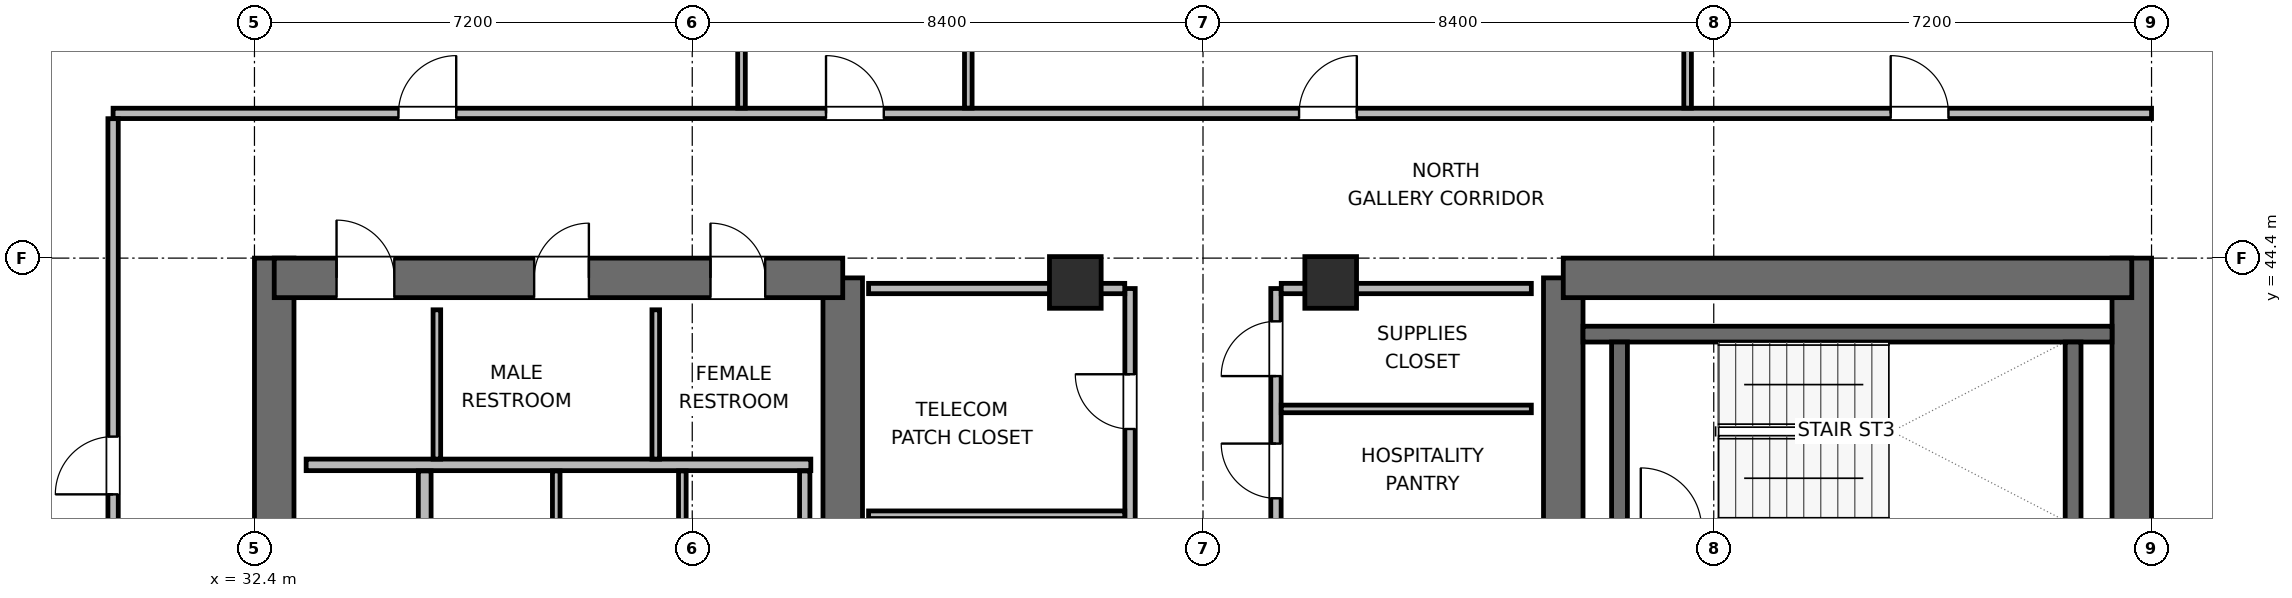
"""IFC4 building model, lengths in metres.
Left out: names, types, materials, properties, quantities, classifications, styles, units other than length and angle.
Written with IfcOpenShell. Run it as: python <this file> out.ifc"""

import sys

from ifc_helpers import new_model, si_unit, direction, frame, frame_2d, origin, origin_2d, place, context, subcontext, project, spatial, rectangle, extrude, element, fill, save


model = new_model("IFC4")
c1 = context("Model", 3, precision=1e-05, world=origin(), true_north=direction((0.0, 1.0)))
c2 = subcontext(c1, "Body", "Model", "MODEL_VIEW")
j1 = project(units=[si_unit("LENGTHUNIT", "METRE"), si_unit("PLANEANGLEUNIT", "RADIAN")], contexts=[c1])
p1 = place(None, origin())
s1 = spatial("IfcSite", under=j1, at=p1, CompositionType="ELEMENT")
p2 = place(p1, origin())
s2 = spatial("IfcBuilding", under=s1, at=p2, CompositionType="ELEMENT")
p3 = place(p2, frame((0.0, 0.0, 251.1)))
s3 = spatial("IfcBuildingStorey", under=s2, at=p3, CompositionType="ELEMENT", Elevation=251.1)
p4 = place(p3, frame((32.725, 27.6, 0.0), z_axis=(0.0, 0.0, 1.0), x_axis=(0.0, 1.0, 0.0)))
e1 = element("IfcWall", 1, at=p4, inside=s3, PredefinedType="SHEAR", context=c2, shape_type="SweptSolid", body=[
    extrude(rectangle(XDim=16.8, YDim=0.65, at=frame_2d((8.4, 0.0))), origin(), (0.0, 0.0, 1.0), 3.9),
])
p5 = place(p3, frame((42.075, 37.8, 0.0), z_axis=(0.0, 0.0, 1.0), x_axis=(0.0, 1.0, 0.0)))
e2 = element("IfcWall", 2, at=p5, inside=s3, PredefinedType="SHEAR", context=c2, shape_type="SweptSolid", body=[
    extrude(rectangle(XDim=6.275, YDim=0.65, at=frame_2d((3.137, 0.0))), origin(), (0.0, 0.0, 1.0), 3.9),
])
p6 = place(p3, frame((32.725, 44.075, 0.0), z_axis=(0.0, 0.0, 1.0), x_axis=(1.0, 0.0, 0.0)))
e3 = element("IfcWall", 3, at=p6, inside=s3, PredefinedType="SHEAR", context=c2, shape_type="SweptSolid", body=[
    extrude(rectangle(XDim=9.35, YDim=0.65, at=frame_2d((4.675, 0.0))), origin(), (0.0, 0.0, 1.0), 3.9),
])
p7 = place(p6, frame((1.025, 0.0, 0.0)))
e4 = element("IfcOpeningElement", 4, at=p7, cuts=e3, PredefinedType="OPENING", context=c2, shape_type="SweptSolid", body=[
    extrude(rectangle(XDim=0.95, YDim=2.04, at=frame_2d((0.475, 1.02))), frame((0.0, 0.335, 0.0), z_axis=(0.0, -1.0, 0.0), x_axis=(1.0, 0.0, 0.0)), (0.0, 0.0, 1.0), 0.67),
])
p8 = place(p6, frame((4.275, 0.0, 0.0)))
e5 = element("IfcOpeningElement", 5, at=p8, cuts=e3, PredefinedType="OPENING", context=c2, shape_type="SweptSolid", body=[
    extrude(rectangle(XDim=0.9, YDim=2.02, at=frame_2d((0.45, 1.01))), frame((0.0, 0.335, 0.0), z_axis=(0.0, -1.0, 0.0), x_axis=(1.0, 0.0, 0.0)), (0.0, 0.0, 1.0), 0.67),
])
p9 = place(p6, frame((7.175, 0.0, 0.0)))
e6 = element("IfcOpeningElement", 6, at=p9, cuts=e3, PredefinedType="OPENING", context=c2, shape_type="SweptSolid", body=[
    extrude(rectangle(XDim=0.9, YDim=2.02, at=frame_2d((0.45, 1.01))), frame((0.0, 0.335, 0.0), z_axis=(0.0, -1.0, 0.0), x_axis=(1.0, 0.0, 0.0)), (0.0, 0.0, 1.0), 0.67),
])
p10 = place(p3, frame((53.925, 38.0, 0.0), z_axis=(0.0, 0.0, 1.0), x_axis=(0.0, 1.0, 0.0)))
e7 = element("IfcWall", 7, at=p10, inside=s3, PredefinedType="SHEAR", context=c2, shape_type="SweptSolid", body=[
    extrude(rectangle(XDim=6.075, YDim=0.65, at=frame_2d((3.038, 0.0))), origin(), (0.0, 0.0, 1.0), 3.9),
])
p11 = place(p3, frame((63.275, 27.6, 0.0), z_axis=(0.0, 0.0, 1.0), x_axis=(0.0, 1.0, 0.0)))
e8 = element("IfcWall", 8, at=p11, inside=s3, PredefinedType="SHEAR", context=c2, shape_type="SweptSolid", body=[
    extrude(rectangle(XDim=16.8, YDim=0.65, at=frame_2d((8.4, 0.0))), origin(), (0.0, 0.0, 1.0), 3.9),
])
p12 = place(p3, frame((53.925, 44.075, 0.0), z_axis=(0.0, 0.0, 1.0), x_axis=(1.0, 0.0, 0.0)))
e9 = element("IfcWall", 9, at=p12, inside=s3, PredefinedType="SHEAR", context=c2, shape_type="SweptSolid", body=[
    extrude(rectangle(XDim=9.35, YDim=0.65, at=frame_2d((4.675, 0.0))), origin(), (0.0, 0.0, 1.0), 3.9),
])
p13 = place(p3, frame((54.25, 43.15, 0.0), z_axis=(0.0, 0.0, 1.0), x_axis=(1.0, 0.0, 0.0)))
e10 = element("IfcWall", 10, at=p13, inside=s3, PredefinedType="SHEAR", context=c2, shape_type="SweptSolid", body=[
    extrude(rectangle(XDim=8.7, YDim=0.26, at=frame_2d((4.35, 0.0))), origin(), (0.0, 0.0, 1.0), 3.9),
])
for number, where, z_axis, x_axis in (
    (11, (54.85, 40.08, 0.0), (0.0, 0.0, 1.0), (0.0, 1.0, 0.0)),
    (12, (62.31, 40.08, 0.0), (0.0, 0.0, 1.0), (0.0, 1.0, 0.0)),
):
    element("IfcWall", number, at=place(p3, frame(where, z_axis=z_axis, x_axis=x_axis)), inside=s3, PredefinedType="SHEAR", context=c2, shape_type="SweptSolid", body=[
        extrude(rectangle(XDim=2.94, YDim=0.26, at=frame_2d((1.47, 0.0))), origin(), (0.0, 0.0, 1.0), 3.9),
    ])
for number, where, z_axis, x_axis in (
    (13, (45.9, 44.0, 0.0), (0.0, 0.0, 1.0), (1.0, 0.0, 0.0)),
    (14, (50.1, 44.0, 0.0), (0.0, 0.0, 1.0), (1.0, 0.0, 0.0)),
):
    element("IfcColumn", number, at=place(p3, frame(where, z_axis=z_axis, x_axis=x_axis)), inside=s3, PredefinedType="COLUMN", context=c2, shape_type="SweptSolid", body=[
        extrude(rectangle(XDim=0.85, YDim=0.85, at=origin_2d()), origin(), (0.0, 0.0, 1.0), 3.9),
    ])
p14 = place(p3, frame((33.25, 41.0, 0.0), z_axis=(0.0, 0.0, 1.0), x_axis=(1.0, 0.0, 0.0)))
e15 = element("IfcWall", 15, at=p14, inside=s3, PredefinedType="PLUMBINGWALL", context=c2, shape_type="SweptSolid", body=[
    extrude(rectangle(XDim=8.3, YDim=0.19, at=frame_2d((4.15, 0.0))), origin(), (0.0, 0.0, 1.0), 3.68),
])
for number, where, z_axis, x_axis in (
    (16, (35.4, 41.095, 0.0), (0.0, 0.0, 1.0), (0.0, 1.0, 0.0)),
    (17, (39.0, 41.095, 0.0), (0.0, 0.0, 1.0), (0.0, 1.0, 0.0)),
):
    element("IfcWall", number, at=place(p3, frame(where, z_axis=z_axis, x_axis=x_axis)), inside=s3, PredefinedType="PARTITIONING", context=c2, shape_type="SweptSolid", body=[
        extrude(rectangle(XDim=2.455, YDim=0.125, at=frame_2d((1.228, 0.0))), origin(), (0.0, 0.0, 1.0), 3.68),
    ])
p15 = place(p3, frame((35.2, 39.58, 0.0), z_axis=(0.0, 0.0, 1.0), x_axis=(0.0, 1.0, 0.0)))
e18 = element("IfcWall", 18, at=p15, inside=s3, PredefinedType="PARTITIONING", context=c2, shape_type="SweptSolid", body=[
    extrude(rectangle(XDim=1.32, YDim=0.21, at=frame_2d((0.66, 0.0))), origin(), (0.0, 0.0, 1.0), 3.68),
])
p16 = place(p3, frame((41.45, 38.087, 0.0), z_axis=(0.0, 0.0, 1.0), x_axis=(0.0, 1.0, 0.0)))
e19 = element("IfcWall", 19, at=p16, inside=s3, PredefinedType="PARTITIONING", context=c2, shape_type="SweptSolid", body=[
    extrude(rectangle(XDim=2.813, YDim=0.17, at=frame_2d((1.406, 0.0))), origin(), (0.0, 0.0, 1.0), 3.68),
])
for number, where, z_axis, x_axis in (
    (20, (37.363, 38.087, 0.0), (0.0, 0.0, 1.0), (0.0, 1.0, 0.0)),
    (21, (39.437, 38.087, 0.0), (0.0, 0.0, 1.0), (0.0, 1.0, 0.0)),
):
    element("IfcWall", number, at=place(p3, frame(where, z_axis=z_axis, x_axis=x_axis)), inside=s3, PredefinedType="PARTITIONING", context=c2, shape_type="SweptSolid", body=[
        extrude(rectangle(XDim=2.813, YDim=0.125, at=frame_2d((1.406, 0.0))), origin(), (0.0, 0.0, 1.0), 3.68),
    ])
p17 = place(p3, frame((46.8, 37.9, 0.0), z_axis=(0.0, 0.0, 1.0), x_axis=(0.0, 1.0, 0.0)))
e22 = element("IfcWall", 22, at=p17, inside=s3, PredefinedType="PARTITIONING", context=c2, shape_type="SweptSolid", body=[
    extrude(rectangle(XDim=6.0, YDim=0.17, at=frame_2d((3.0, 0.0))), origin(), (0.0, 0.0, 1.0), 3.68),
])
p18 = place(p17, frame((0.69, 0.0, 0.0)))
e23 = element("IfcOpeningElement", 23, at=p18, cuts=e22, PredefinedType="OPENING", context=c2, shape_type="SweptSolid", body=[
    extrude(rectangle(XDim=0.9, YDim=2.02, at=frame_2d((0.45, 1.01))), frame((0.0, 0.095, 0.0), z_axis=(0.0, -1.0, 0.0), x_axis=(1.0, 0.0, 0.0)), (0.0, 0.0, 1.0), 0.19),
])
p19 = place(p17, frame((3.69, 0.0, 0.0)))
e24 = element("IfcOpeningElement", 24, at=p19, cuts=e22, PredefinedType="OPENING", context=c2, shape_type="SweptSolid", body=[
    extrude(rectangle(XDim=0.9, YDim=2.02, at=frame_2d((0.45, 1.01))), frame((0.0, 0.095, 0.0), z_axis=(0.0, -1.0, 0.0), x_axis=(1.0, 0.0, 0.0)), (0.0, 0.0, 1.0), 0.19),
])
p20 = place(p3, frame((42.5, 43.9, 0.0), z_axis=(0.0, 0.0, 1.0), x_axis=(1.0, 0.0, 0.0)))
e25 = element("IfcWall", 25, at=p20, inside=s3, PredefinedType="PARTITIONING", context=c2, shape_type="SweptSolid", body=[
    extrude(rectangle(XDim=4.213, YDim=0.17, at=frame_2d((2.106, 0.0))), origin(), (0.0, 0.0, 1.0), 2.765),
])
p21 = place(p3, frame((42.5, 40.18, 0.0), z_axis=(0.0, 0.0, 1.0), x_axis=(1.0, 0.0, 0.0)))
e26 = element("IfcWall", 26, at=p21, inside=s3, PredefinedType="PARTITIONING", context=c2, shape_type="SweptSolid", body=[
    extrude(rectangle(XDim=4.213, YDim=0.125, at=frame_2d((2.106, 0.0))), origin(), (0.0, 0.0, 1.0), 3.68),
])
p22 = place(p3, frame((49.2, 37.9, 0.0), z_axis=(0.0, 0.0, 1.0), x_axis=(0.0, 1.0, 0.0)))
e27 = element("IfcWall", 27, at=p22, inside=s3, PredefinedType="PARTITIONING", context=c2, shape_type="SweptSolid", body=[
    extrude(rectangle(XDim=6.0, YDim=0.17, at=frame_2d((3.0, 0.0))), origin(), (0.0, 0.0, 1.0), 3.68),
])
p23 = place(p22, frame((0.54, 0.0, 0.0)))
e28 = element("IfcOpeningElement", 28, at=p23, cuts=e27, PredefinedType="OPENING", context=c2, shape_type="SweptSolid", body=[
    extrude(rectangle(XDim=0.9, YDim=2.02, at=frame_2d((0.45, 1.01))), frame((0.0, 0.095, 0.0), z_axis=(0.0, -1.0, 0.0), x_axis=(1.0, 0.0, 0.0)), (0.0, 0.0, 1.0), 0.19),
])
p24 = place(p22, frame((2.55, 0.0, 0.0)))
e29 = element("IfcOpeningElement", 29, at=p24, cuts=e27, PredefinedType="OPENING", context=c2, shape_type="SweptSolid", body=[
    extrude(rectangle(XDim=0.9, YDim=2.02, at=frame_2d((0.45, 1.01))), frame((0.0, 0.095, 0.0), z_axis=(0.0, -1.0, 0.0), x_axis=(1.0, 0.0, 0.0)), (0.0, 0.0, 1.0), 0.19),
])
p25 = place(p22, frame((4.56, 0.0, 0.0)))
e30 = element("IfcOpeningElement", 30, at=p25, cuts=e27, PredefinedType="OPENING", context=c2, shape_type="SweptSolid", body=[
    extrude(rectangle(XDim=0.9, YDim=2.02, at=frame_2d((0.45, 1.01))), frame((0.0, 0.095, 0.0), z_axis=(0.0, -1.0, 0.0), x_axis=(1.0, 0.0, 0.0)), (0.0, 0.0, 1.0), 0.19),
])
p26 = place(p3, frame((49.287, 43.9, 0.0), z_axis=(0.0, 0.0, 1.0), x_axis=(1.0, 0.0, 0.0)))
e31 = element("IfcWall", 31, at=p26, inside=s3, PredefinedType="PARTITIONING", context=c2, shape_type="SweptSolid", body=[
    extrude(rectangle(XDim=4.113, YDim=0.17, at=frame_2d((2.056, 0.0))), origin(), (0.0, 0.0, 1.0), 2.765),
])
p27 = place(p3, frame((49.287, 41.92, 0.0), z_axis=(0.0, 0.0, 1.0), x_axis=(1.0, 0.0, 0.0)))
e32 = element("IfcWall", 32, at=p27, inside=s3, PredefinedType="PARTITIONING", context=c2, shape_type="SweptSolid", body=[
    extrude(rectangle(XDim=4.113, YDim=0.125, at=frame_2d((2.056, 0.0))), origin(), (0.0, 0.0, 1.0), 3.68),
])
p28 = place(p3, frame((30.075, 46.78, 0.0), z_axis=(0.0, 0.0, 1.0), x_axis=(1.0, 0.0, 0.0)))
e33 = element("IfcWall", 33, at=p28, inside=s3, PredefinedType="PARTITIONING", context=c2, shape_type="SweptSolid", body=[
    extrude(rectangle(XDim=33.525, YDim=0.17, at=frame_2d((16.763, 0.0))), origin(), (0.0, 0.0, 1.0), 3.68),
])
p29 = place(p28, frame((4.693, 0.0, 0.0)))
e34 = element("IfcOpeningElement", 34, at=p29, cuts=e33, PredefinedType="OPENING", context=c2, shape_type="SweptSolid", body=[
    extrude(rectangle(XDim=0.95, YDim=2.04, at=frame_2d((0.475, 1.02))), frame((0.0, 0.095, 0.0), z_axis=(0.0, -1.0, 0.0), x_axis=(1.0, 0.0, 0.0)), (0.0, 0.0, 1.0), 0.19),
])
p30 = place(p28, frame((11.725, 0.0, 0.0)))
e35 = element("IfcOpeningElement", 35, at=p30, cuts=e33, PredefinedType="OPENING", context=c2, shape_type="SweptSolid", body=[
    extrude(rectangle(XDim=0.95, YDim=2.04, at=frame_2d((0.475, 1.02))), frame((0.0, 0.095, 0.0), z_axis=(0.0, -1.0, 0.0), x_axis=(1.0, 0.0, 0.0)), (0.0, 0.0, 1.0), 0.19),
])
p31 = place(p28, frame((19.505, 0.0, 0.0)))
e36 = element("IfcOpeningElement", 36, at=p31, cuts=e33, PredefinedType="OPENING", context=c2, shape_type="SweptSolid", body=[
    extrude(rectangle(XDim=0.95, YDim=2.04, at=frame_2d((0.475, 1.02))), frame((0.0, 0.095, 0.0), z_axis=(0.0, -1.0, 0.0), x_axis=(1.0, 0.0, 0.0)), (0.0, 0.0, 1.0), 0.19),
])
p32 = place(p28, frame((29.235, 0.0, 0.0)))
e37 = element("IfcOpeningElement", 37, at=p32, cuts=e33, PredefinedType="OPENING", context=c2, shape_type="SweptSolid", body=[
    extrude(rectangle(XDim=0.95, YDim=2.04, at=frame_2d((0.475, 1.02))), frame((0.0, 0.095, 0.0), z_axis=(0.0, -1.0, 0.0), x_axis=(1.0, 0.0, 0.0)), (0.0, 0.0, 1.0), 0.19),
])
p33 = place(p3, frame((30.075, 25.307, 0.0), z_axis=(0.0, 0.0, 1.0), x_axis=(0.0, 1.0, 0.0)))
e38 = element("IfcWall", 38, at=p33, inside=s3, PredefinedType="PARTITIONING", context=c2, shape_type="SweptSolid", body=[
    extrude(rectangle(XDim=21.386, YDim=0.17, at=frame_2d((10.693, 0.0))), origin(), (0.0, 0.0, 1.0), 3.68),
])
p34 = place(p33, frame((4.428, 0.0, 0.0)))
e39 = element("IfcOpeningElement", 39, at=p34, cuts=e38, PredefinedType="OPENING", context=c2, shape_type="SweptSolid", body=[
    extrude(rectangle(XDim=0.95, YDim=2.04, at=frame_2d((0.475, 1.02))), frame((0.0, 0.095, 0.0), z_axis=(0.0, -1.0, 0.0), x_axis=(1.0, 0.0, 0.0)), (0.0, 0.0, 1.0), 0.19),
])
p35 = place(p33, frame((15.208, 0.0, 0.0)))
e40 = element("IfcOpeningElement", 40, at=p35, cuts=e38, PredefinedType="OPENING", context=c2, shape_type="SweptSolid", body=[
    extrude(rectangle(XDim=0.95, YDim=2.04, at=frame_2d((0.475, 1.02))), frame((0.0, 0.095, 0.0), z_axis=(0.0, -1.0, 0.0), x_axis=(1.0, 0.0, 0.0)), (0.0, 0.0, 1.0), 0.19),
])
p36 = place(p3, frame((40.41, 46.867, 0.0), z_axis=(0.0, 0.0, 1.0), x_axis=(0.0, 1.0, 0.0)))
e41 = element("IfcWall", 41, at=p36, inside=s3, PredefinedType="PARTITIONING", context=c2, shape_type="SweptSolid", body=[
    extrude(rectangle(XDim=15.298, YDim=0.125, at=frame_2d((7.649, 0.0))), origin(), (0.0, 0.0, 1.0), 3.023),
])
p37 = place(p3, frame((44.14, 46.867, 0.0), z_axis=(0.0, 0.0, 1.0), x_axis=(0.0, 1.0, 0.0)))
e42 = element("IfcWall", 42, at=p37, inside=s3, PredefinedType="PARTITIONING", context=c2, shape_type="SweptSolid", body=[
    extrude(rectangle(XDim=13.858, YDim=0.125, at=frame_2d((6.929, 0.0))), origin(), (0.0, 0.0, 1.0), 3.023),
])
p38 = place(p3, frame((55.97, 46.867, 0.0), z_axis=(0.0, 0.0, 1.0), x_axis=(0.0, 1.0, 0.0)))
e43 = element("IfcWall", 43, at=p38, inside=s3, PredefinedType="PARTITIONING", context=c2, shape_type="SweptSolid", body=[
    extrude(rectangle(XDim=15.258, YDim=0.125, at=frame_2d((7.629, 0.0))), origin(), (0.0, 0.0, 1.0), 2.195),
])
p39 = place(p7, origin())
e44 = element("IfcDoor", 44, at=p39, inside=s3, OperationType="SINGLE_SWING_LEFT", PredefinedType="DOOR", context=c2, shape_type="SweptSolid", body=[
    extrude(rectangle(XDim=0.95, YDim=2.04, at=frame_2d((0.475, 1.02))), frame((0.0, 0.025, 0.0), z_axis=(0.0, -1.0, 0.0), x_axis=(1.0, 0.0, 0.0)), (0.0, 0.0, 1.0), 0.05),
])
fill(e4, e44)
p40 = place(p8, origin())
e45 = element("IfcDoor", 45, at=p40, inside=s3, OperationType="SINGLE_SWING_RIGHT", PredefinedType="DOOR", context=c2, shape_type="SweptSolid", body=[
    extrude(rectangle(XDim=0.9, YDim=2.02, at=frame_2d((0.45, 1.01))), frame((0.0, 0.025, 0.0), z_axis=(0.0, -1.0, 0.0), x_axis=(1.0, 0.0, 0.0)), (0.0, 0.0, 1.0), 0.05),
])
fill(e5, e45)
p41 = place(p9, origin())
e46 = element("IfcDoor", 46, at=p41, inside=s3, OperationType="SINGLE_SWING_LEFT", PredefinedType="DOOR", context=c2, shape_type="SweptSolid", body=[
    extrude(rectangle(XDim=0.9, YDim=2.02, at=frame_2d((0.45, 1.01))), frame((0.0, 0.025, 0.0), z_axis=(0.0, -1.0, 0.0), x_axis=(1.0, 0.0, 0.0)), (0.0, 0.0, 1.0), 0.05),
])
fill(e6, e46)
p42 = place(p19, origin())
e47 = element("IfcDoor", 47, at=p42, inside=s3, OperationType="SINGLE_SWING_RIGHT", PredefinedType="DOOR", context=c2, shape_type="SweptSolid", body=[
    extrude(rectangle(XDim=0.9, YDim=2.02, at=frame_2d((0.45, 1.01))), frame((0.0, 0.025, 0.0), z_axis=(0.0, -1.0, 0.0), x_axis=(1.0, 0.0, 0.0)), (0.0, 0.0, 1.0), 0.05),
])
fill(e24, e47)
p43 = place(p24, origin())
e48 = element("IfcDoor", 48, at=p43, inside=s3, OperationType="SINGLE_SWING_RIGHT", PredefinedType="DOOR", context=c2, shape_type="SweptSolid", body=[
    extrude(rectangle(XDim=0.9, YDim=2.02, at=frame_2d((0.45, 1.01))), frame((0.0, 0.025, 0.0), z_axis=(0.0, -1.0, 0.0), x_axis=(1.0, 0.0, 0.0)), (0.0, 0.0, 1.0), 0.05),
])
fill(e29, e48)
p44 = place(p25, origin())
e49 = element("IfcDoor", 49, at=p44, inside=s3, OperationType="SINGLE_SWING_LEFT", PredefinedType="DOOR", context=c2, shape_type="SweptSolid", body=[
    extrude(rectangle(XDim=0.9, YDim=2.02, at=frame_2d((0.45, 1.01))), frame((0.0, 0.025, 0.0), z_axis=(0.0, -1.0, 0.0), x_axis=(1.0, 0.0, 0.0)), (0.0, 0.0, 1.0), 0.05),
])
fill(e30, e49)
p45 = place(p29, origin())
e50 = element("IfcDoor", 50, at=p45, inside=s3, OperationType="SINGLE_SWING_RIGHT", PredefinedType="DOOR", context=c2, shape_type="SweptSolid", body=[
    extrude(rectangle(XDim=0.95, YDim=2.04, at=frame_2d((0.475, 1.02))), frame((0.0, 0.025, 0.0), z_axis=(0.0, -1.0, 0.0), x_axis=(1.0, 0.0, 0.0)), (0.0, 0.0, 1.0), 0.05),
])
fill(e34, e50)
p46 = place(p30, origin())
e51 = element("IfcDoor", 51, at=p46, inside=s3, OperationType="SINGLE_SWING_LEFT", PredefinedType="DOOR", context=c2, shape_type="SweptSolid", body=[
    extrude(rectangle(XDim=0.95, YDim=2.04, at=frame_2d((0.475, 1.02))), frame((0.0, 0.025, 0.0), z_axis=(0.0, -1.0, 0.0), x_axis=(1.0, 0.0, 0.0)), (0.0, 0.0, 1.0), 0.05),
])
fill(e35, e51)
p47 = place(p31, origin())
e52 = element("IfcDoor", 52, at=p47, inside=s3, OperationType="SINGLE_SWING_RIGHT", PredefinedType="DOOR", context=c2, shape_type="SweptSolid", body=[
    extrude(rectangle(XDim=0.95, YDim=2.04, at=frame_2d((0.475, 1.02))), frame((0.0, 0.025, 0.0), z_axis=(0.0, -1.0, 0.0), x_axis=(1.0, 0.0, 0.0)), (0.0, 0.0, 1.0), 0.05),
])
fill(e36, e52)
p48 = place(p32, origin())
e53 = element("IfcDoor", 53, at=p48, inside=s3, OperationType="SINGLE_SWING_LEFT", PredefinedType="DOOR", context=c2, shape_type="SweptSolid", body=[
    extrude(rectangle(XDim=0.95, YDim=2.04, at=frame_2d((0.475, 1.02))), frame((0.0, 0.025, 0.0), z_axis=(0.0, -1.0, 0.0), x_axis=(1.0, 0.0, 0.0)), (0.0, 0.0, 1.0), 0.05),
])
fill(e37, e53)
p49 = place(p35, origin())
e54 = element("IfcDoor", 54, at=p49, inside=s3, OperationType="SINGLE_SWING_LEFT", PredefinedType="DOOR", context=c2, shape_type="SweptSolid", body=[
    extrude(rectangle(XDim=0.95, YDim=2.04, at=frame_2d((0.475, 1.02))), frame((0.0, 0.025, 0.0), z_axis=(0.0, -1.0, 0.0), x_axis=(1.0, 0.0, 0.0)), (0.0, 0.0, 1.0), 0.05),
])
fill(e40, e54)
save(model, sys.argv[1])
